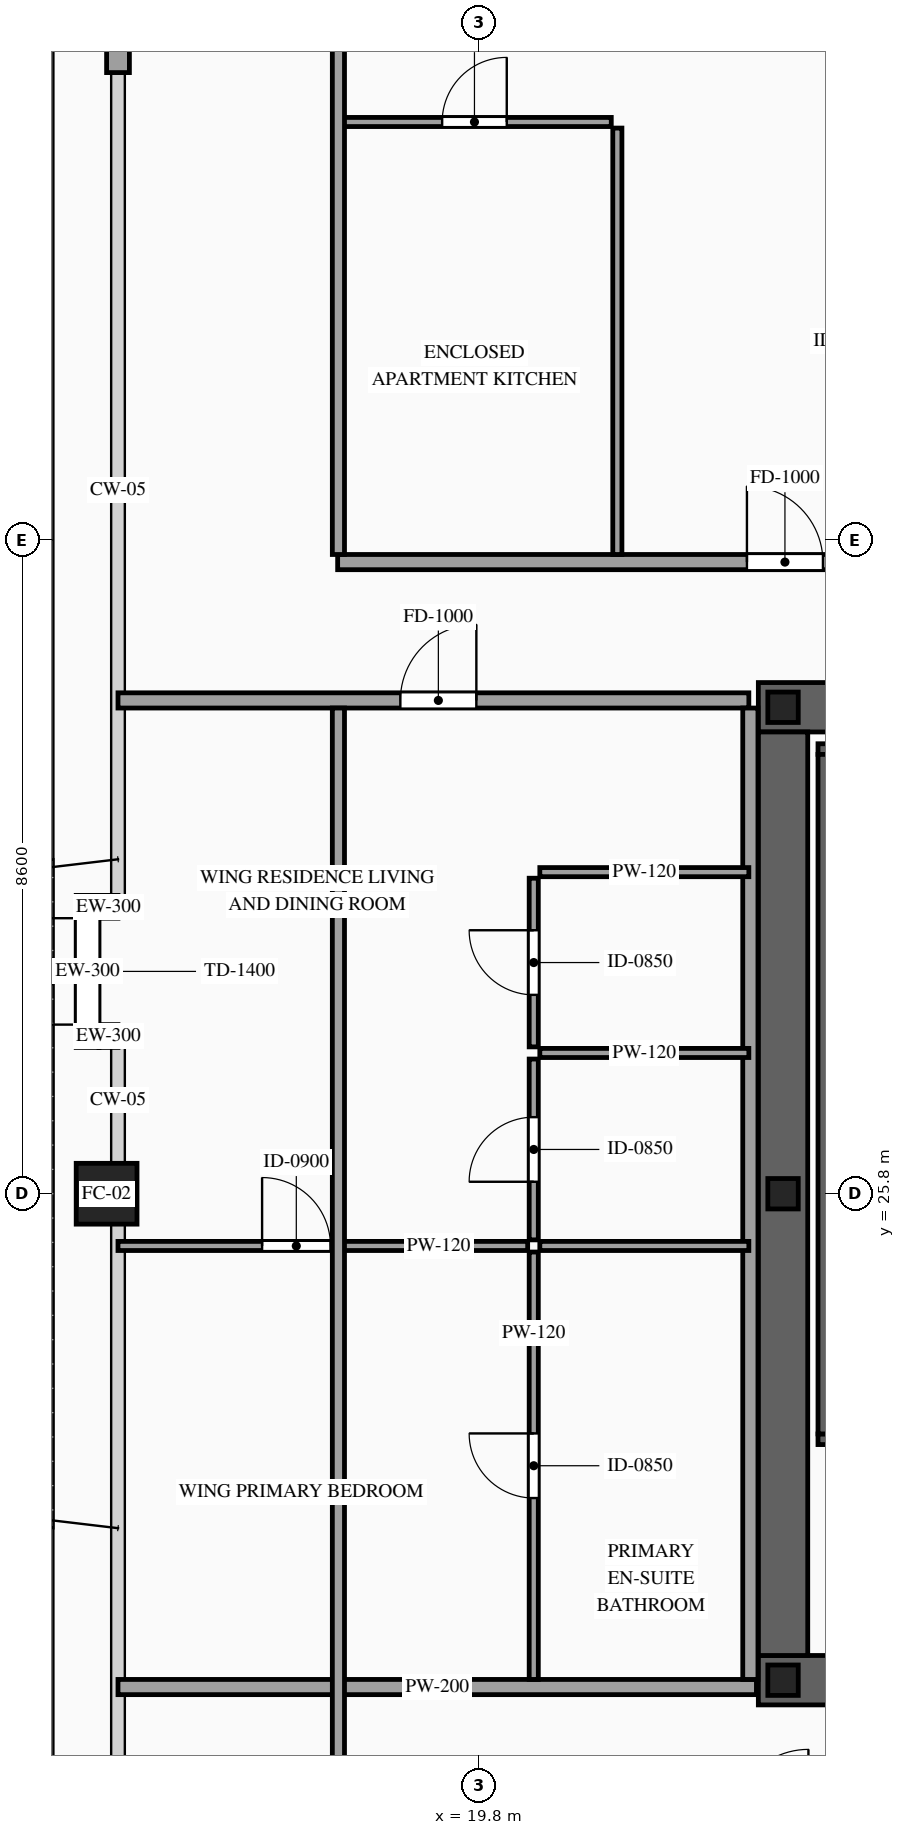
"""IFC4 building model, lengths in metres.
Left out: names, types, materials, properties, quantities, classifications, styles, units other than length and angle.
Written with IfcOpenShell. Run it as: python <this file> out.ifc"""

import sys

from ifc_helpers import new_model, si_unit, direction, frame, frame_2d, origin, origin_2d, place, context, subcontext, project, spatial, rectangle, hollow_rectangle, i_section, extrude, source, transform, mapped, element, fill, save


model = new_model("IFC4")
c1 = context("Model", 3, precision=1e-05, world=origin(), true_north=direction((0.0, 1.0)))
c2 = subcontext(c1, "Body", "Model", "MODEL_VIEW")
j1 = project(units=[si_unit("LENGTHUNIT", "METRE"), si_unit("PLANEANGLEUNIT", "RADIAN")], contexts=[c1])
p1 = place(None, origin())
s1 = spatial("IfcSite", under=j1, at=p1, CompositionType="ELEMENT")
p2 = place(p1, origin())
s2 = spatial("IfcBuilding", under=s1, at=p2, CompositionType="ELEMENT")
p3 = place(p2, frame((0.0, 0.0, 205.5)))
s3 = spatial("IfcBuildingStorey", under=s2, at=p3, CompositionType="ELEMENT", Elevation=205.5)
p4 = place(p3, frame((23.475, 19.4, 0.0), z_axis=(0.0, 0.0, 1.0), x_axis=(1.0, 0.0, 0.0)))
e1 = element("IfcWall", 1, at=p4, inside=s3, PredefinedType="SHEAR", context=c2, shape_type="SweptSolid", body=[
    extrude(rectangle(XDim=27.05, YDim=0.65, at=frame_2d((13.525, 0.0))), origin(), (0.0, 0.0, 1.0), 3.5),
])
p5 = place(p4, frame((1.975, 0.0, 0.0)))
e2 = element("IfcOpeningElement", 2, at=p5, cuts=e1, PredefinedType="OPENING", context=c2, shape_type="SweptSolid", body=[
    extrude(rectangle(XDim=1.1, YDim=2.2, at=frame_2d((0.55, 1.1))), frame((0.0, 0.34, 0.0), z_axis=(0.0, -1.0, 0.0), x_axis=(1.0, 0.0, 0.0)), (0.0, 0.0, 1.0), 0.68),
])
p6 = place(p4, frame((9.875, 0.0, 0.0)))
e3 = element("IfcOpeningElement", 3, at=p6, cuts=e1, PredefinedType="OPENING", context=c2, shape_type="SweptSolid", body=[
    extrude(rectangle(XDim=1.1, YDim=2.2, at=frame_2d((0.55, 1.1))), frame((0.0, 0.34, 0.0), z_axis=(0.0, -1.0, 0.0), x_axis=(1.0, 0.0, 0.0)), (0.0, 0.0, 1.0), 0.68),
])
p7 = place(p4, frame((23.075, 0.0, 0.0)))
e4 = element("IfcOpeningElement", 4, at=p7, cuts=e1, PredefinedType="OPENING", context=c2, shape_type="SweptSolid", body=[
    extrude(rectangle(XDim=1.1, YDim=2.2, at=frame_2d((0.55, 1.1))), frame((0.0, 0.34, 0.0), z_axis=(0.0, -1.0, 0.0), x_axis=(1.0, 0.0, 0.0)), (0.0, 0.0, 1.0), 0.68),
])
p8 = place(p4, frame((19.695, 0.0, 0.0)))
e5 = element("IfcOpeningElement", 5, at=p8, cuts=e1, PredefinedType="OPENING", context=c2, shape_type="SweptSolid", body=[
    extrude(rectangle(XDim=0.9, YDim=2.15, at=frame_2d((0.45, 1.075))), frame((0.0, 0.34, 0.0), z_axis=(0.0, -1.0, 0.0), x_axis=(1.0, 0.0, 0.0)), (0.0, 0.0, 1.0), 0.68),
])
p9 = place(p4, frame((18.255, 0.0, 0.0)))
e6 = element("IfcOpeningElement", 6, at=p9, cuts=e1, PredefinedType="OPENING", context=c2, shape_type="SweptSolid", body=[
    extrude(rectangle(XDim=0.9, YDim=2.15, at=frame_2d((0.45, 1.075))), frame((0.0, 0.34, 0.0), z_axis=(0.0, -1.0, 0.0), x_axis=(1.0, 0.0, 0.0)), (0.0, 0.0, 1.0), 0.68),
])
p10 = place(p3, frame((23.475, 32.2, 0.0), z_axis=(0.0, 0.0, 1.0), x_axis=(1.0, 0.0, 0.0)))
e7 = element("IfcWall", 7, at=p10, inside=s3, PredefinedType="SHEAR", context=c2, shape_type="SweptSolid", body=[
    extrude(rectangle(XDim=27.05, YDim=0.65, at=frame_2d((13.525, 0.0))), origin(), (0.0, 0.0, 1.0), 3.5),
])
p11 = place(p10, frame((4.595, 0.0, 0.0)))
e8 = element("IfcOpeningElement", 8, at=p11, cuts=e7, PredefinedType="OPENING", context=c2, shape_type="SweptSolid", body=[
    extrude(rectangle(XDim=0.9, YDim=2.15, at=frame_2d((0.45, 1.075))), frame((0.0, 0.34, 0.0), z_axis=(0.0, -1.0, 0.0), x_axis=(1.0, 0.0, 0.0)), (0.0, 0.0, 1.0), 0.68),
])
p12 = place(p10, frame((9.875, 0.0, 0.0)))
e9 = element("IfcOpeningElement", 9, at=p12, cuts=e7, PredefinedType="OPENING", context=c2, shape_type="SweptSolid", body=[
    extrude(rectangle(XDim=1.1, YDim=2.2, at=frame_2d((0.55, 1.1))), frame((0.0, 0.34, 0.0), z_axis=(0.0, -1.0, 0.0), x_axis=(1.0, 0.0, 0.0)), (0.0, 0.0, 1.0), 0.68),
])
p13 = place(p10, frame((15.725, 0.0, 0.0)))
e10 = element("IfcOpeningElement", 10, at=p13, cuts=e7, PredefinedType="OPENING", context=c2, shape_type="SweptSolid", body=[
    extrude(rectangle(XDim=1.1, YDim=2.2, at=frame_2d((0.55, 1.1))), frame((0.0, 0.34, 0.0), z_axis=(0.0, -1.0, 0.0), x_axis=(1.0, 0.0, 0.0)), (0.0, 0.0, 1.0), 0.68),
])
m1 = source(origin(), c2, "Body", "SweptSolid", [
    extrude(rectangle(XDim=12.15, YDim=0.65, at=frame_2d((6.075, 0.0))), origin(), (0.0, 0.0, 1.0), 3.5),
])
p14 = place(p3, frame((23.8, 19.725, 0.0), z_axis=(0.0, 0.0, 1.0), x_axis=(0.0, 1.0, 0.0)))
e11 = element("IfcWall", 11, at=p14, inside=s3, PredefinedType="SHEAR", context=c2, shape_type="MappedRepresentation", body=[
    mapped(m1, transform((0.0, 0.0, 0.0), scale=1.0)),
])
m2 = source(origin(), c2, "Body", "SweptSolid", [
    extrude(i_section(OverallWidth=0.4, OverallDepth=0.4, WebThickness=0.013, FlangeThickness=0.021, at=origin_2d()), origin(), (0.0, 0.0, 1.0), 3.5),
])
for number, where, z_axis, x_axis in (
    (12, (23.8, 19.4, 0.0), (0.0, 0.0, 1.0), (1.0, 0.0, 0.0)),
    (13, (23.8, 25.8, 0.0), (0.0, 0.0, 1.0), (1.0, 0.0, 0.0)),
    (14, (23.8, 32.2, 0.0), (0.0, 0.0, 1.0), (1.0, 0.0, 0.0)),
):
    element("IfcColumn", number, at=place(p3, frame(where, z_axis=z_axis, x_axis=x_axis)), inside=s3, PredefinedType="COLUMN", context=c2, shape_type="MappedRepresentation", body=[
        mapped(m2, transform((0.0, 0.0, 0.0), scale=1.0)),
    ])
m3 = source(origin(), c2, "Body", "SweptSolid", [
    extrude(hollow_rectangle(XDim=0.8, YDim=0.8, WallThickness=0.036, at=origin_2d()), origin(), (0.0, 0.0, 1.0), 3.5),
])
p15 = place(p3, frame((14.9, 25.8, 0.0), z_axis=(0.0, 0.0, 1.0), x_axis=(1.0, 0.0, 0.0)))
e15 = element("IfcColumn", 15, at=p15, inside=s3, PredefinedType="COLUMN", context=c2, shape_type="MappedRepresentation", body=[
    mapped(m3, transform((0.0, 0.0, 0.0), scale=1.0)),
])
m4 = source(origin(), c2, "Body", "SweptSolid", [
    extrude(rectangle(XDim=3.05, YDim=0.3, at=frame_2d((1.525, 0.0))), origin(), (0.0, 0.0, 1.0), 2.835),
])
p16 = place(p3, frame((15.05, 40.55, 0.0), z_axis=(0.0, 0.0, 1.0), x_axis=(0.0, 1.0, 0.0)))
e16 = element("IfcWall", 16, at=p16, inside=s3, PredefinedType="SOLIDWALL", context=c2, shape_type="MappedRepresentation", body=[
    mapped(m4, transform((0.0, 0.0, 0.0), scale=1.0)),
])
p17 = place(p3, frame((14.65, 27.725, 0.0), z_axis=(0.0, 0.0, 1.0), x_axis=(0.0, 1.0, 0.0)))
e17 = element("IfcWall", 17, at=p17, inside=s3, PredefinedType="SOLIDWALL", context=c2, shape_type="SweptSolid", body=[
    extrude(rectangle(XDim=2.0, YDim=0.3, at=frame_2d((1.0, 0.0))), origin(), (0.0, 0.0, 1.0), 2.835),
])
p18 = place(p17, frame((0.3, 0.0, 0.0)))
e18 = element("IfcOpeningElement", 18, at=p18, cuts=e17, PredefinedType="OPENING", context=c2, shape_type="SweptSolid", body=[
    extrude(rectangle(XDim=1.4, YDim=2.3, at=frame_2d((0.7, 1.15))), frame((0.0, 0.165, 0.0), z_axis=(0.0, -1.0, 0.0), x_axis=(1.0, 0.0, 0.0)), (0.0, 0.0, 1.0), 0.33),
])
m5 = source(origin(), c2, "Body", "SweptSolid", [
    extrude(rectangle(XDim=0.25, YDim=0.3, at=frame_2d((0.125, 0.0))), origin(), (0.0, 0.0, 1.0), 3.28),
])
for number, where, z_axis, x_axis in (
    (19, (15.05, 27.875, 0.0), (0.0, 0.0, 1.0), (-1.0, 0.0, 0.0)),
    (20, (14.8, 29.575, 0.0), (0.0, 0.0, 1.0), (1.0, 0.0, 0.0)),
):
    element("IfcWall", number, at=place(p3, frame(where, z_axis=z_axis, x_axis=x_axis)), inside=s3, PredefinedType="SOLIDWALL", context=c2, shape_type="MappedRepresentation", body=[
        mapped(m5, transform((0.0, 0.0, 0.0), scale=1.0)),
    ])
p19 = place(p3, frame((24.26, 22.57, 0.0), z_axis=(0.0, 0.0, 1.0), x_axis=(1.0, 0.0, 0.0)))
e21 = element("IfcWall", 21, at=p19, inside=s3, PredefinedType="SOLIDWALL", context=c2, shape_type="SweptSolid", body=[
    extrude(rectangle(XDim=3.28, YDim=0.14, at=frame_2d((1.64, 0.0))), origin(), (0.0, 0.0, 1.0), 3.28),
])
p20 = place(p19, frame((1.09, 0.0, 0.0)))
e22 = element("IfcOpeningElement", 22, at=p20, cuts=e21, PredefinedType="OPENING", context=c2, shape_type="SweptSolid", body=[
    extrude(rectangle(XDim=1.1, YDim=2.2, at=frame_2d((0.55, 1.1))), frame((0.0, 0.085, 0.0), z_axis=(0.0, -1.0, 0.0), x_axis=(1.0, 0.0, 0.0)), (0.0, 0.0, 1.0), 0.17),
])
m6 = source(origin(), c2, "Body", "SweptSolid", [
    extrude(rectangle(XDim=3.28, YDim=0.14, at=frame_2d((1.64, 0.0))), origin(), (0.0, 0.0, 1.0), 3.28),
])
p21 = place(p3, frame((24.26, 31.65, 0.0), z_axis=(0.0, 0.0, 1.0), x_axis=(1.0, 0.0, 0.0)))
e23 = element("IfcWall", 23, at=p21, inside=s3, PredefinedType="SOLIDWALL", context=c2, shape_type="MappedRepresentation", body=[
    mapped(m6, transform((0.0, 0.0, 0.0), scale=1.0)),
])
m7 = source(origin(), c2, "Body", "SweptSolid", [
    extrude(rectangle(XDim=8.94, YDim=0.14, at=frame_2d((4.47, 0.0))), origin(), (0.0, 0.0, 1.0), 3.28),
])
p22 = place(p3, frame((24.33, 22.64, 0.0), z_axis=(0.0, 0.0, 1.0), x_axis=(0.0, 1.0, 0.0)))
e24 = element("IfcWall", 24, at=p22, inside=s3, PredefinedType="SOLIDWALL", context=c2, shape_type="MappedRepresentation", body=[
    mapped(m7, transform((0.0, 0.0, 0.0), scale=1.0)),
])
p23 = place(p3, frame((17.94, 34.11, 0.0), z_axis=(0.0, 0.0, 1.0), x_axis=(1.0, 0.0, 0.0)))
e25 = element("IfcWall", 25, at=p23, inside=s3, PredefinedType="PARTITIONING", context=c2, shape_type="SweptSolid", body=[
    extrude(rectangle(XDim=12.881, YDim=0.2, at=frame_2d((6.44, 0.0))), origin(), (0.0, 0.0, 1.0), 3.28),
])
p24 = place(p23, frame((5.385, 0.0, 0.0)))
e26 = element("IfcOpeningElement", 26, at=p24, cuts=e25, PredefinedType="OPENING", context=c2, shape_type="SweptSolid", body=[
    extrude(rectangle(XDim=1.0, YDim=2.2, at=frame_2d((0.5, 1.1))), frame((0.0, 0.115, 0.0), z_axis=(0.0, -1.0, 0.0), x_axis=(1.0, 0.0, 0.0)), (0.0, 0.0, 1.0), 0.23),
])
p25 = place(p3, frame((17.94, 39.9, 0.0), z_axis=(0.0, 0.0, 1.0), x_axis=(1.0, 0.0, 0.0)))
e27 = element("IfcWall", 27, at=p25, inside=s3, PredefinedType="PARTITIONING", context=c2, shape_type="SweptSolid", body=[
    extrude(rectangle(XDim=3.6, YDim=0.12, at=frame_2d((1.8, 0.0))), origin(), (0.0, 0.0, 1.0), 3.28),
])
p26 = place(p25, frame((1.375, 0.0, 0.0)))
e28 = element("IfcOpeningElement", 28, at=p26, cuts=e27, PredefinedType="OPENING", context=c2, shape_type="SweptSolid", body=[
    extrude(rectangle(XDim=0.85, YDim=2.1, at=frame_2d((0.425, 1.05))), frame((0.0, 0.075, 0.0), z_axis=(0.0, -1.0, 0.0), x_axis=(1.0, 0.0, 0.0)), (0.0, 0.0, 1.0), 0.15),
])
m8 = source(origin(), c2, "Body", "SweptSolid", [
    extrude(rectangle(XDim=5.61, YDim=0.12, at=frame_2d((2.805, 0.0))), origin(), (0.0, 0.0, 1.0), 3.28),
])
p27 = place(p3, frame((21.62, 34.21, 0.0), z_axis=(0.0, 0.0, 1.0), x_axis=(0.0, 1.0, 0.0)))
e29 = element("IfcWall", 29, at=p27, inside=s3, PredefinedType="PARTITIONING", context=c2, shape_type="MappedRepresentation", body=[
    mapped(m8, transform((0.0, 0.0, 0.0), scale=1.0)),
])
m9 = source(origin(), c2, "Body", "SweptSolid", [
    extrude(rectangle(XDim=13.39, YDim=0.16, at=frame_2d((6.695, 0.0))), origin(), (0.0, 0.0, 1.0), 3.28),
])
p28 = place(p3, frame((17.95, 34.21, 0.0), z_axis=(0.0, 0.0, 1.0), x_axis=(0.0, 1.0, 0.0)))
e30 = element("IfcWall", 30, at=p28, inside=s3, PredefinedType="PARTITIONING", context=c2, shape_type="MappedRepresentation", body=[
    mapped(m9, transform((0.0, 0.0, 0.0), scale=1.0)),
])
p29 = place(p3, frame((15.05, 32.29, 0.0), z_axis=(0.0, 0.0, 1.0), x_axis=(1.0, 0.0, 0.0)))
e31 = element("IfcWall", 31, at=p29, inside=s3, PredefinedType="PARTITIONING", context=c2, shape_type="SweptSolid", body=[
    extrude(rectangle(XDim=8.3, YDim=0.2, at=frame_2d((4.15, 0.0))), origin(), (0.0, 0.0, 1.0), 2.775),
])
p30 = place(p29, frame((3.715, 0.0, 0.0)))
e32 = element("IfcOpeningElement", 32, at=p30, cuts=e31, PredefinedType="OPENING", context=c2, shape_type="SweptSolid", body=[
    extrude(rectangle(XDim=1.0, YDim=2.2, at=frame_2d((0.5, 1.1))), frame((0.0, 0.115, 0.0), z_axis=(0.0, -1.0, 0.0), x_axis=(1.0, 0.0, 0.0)), (0.0, 0.0, 1.0), 0.23),
])
m10 = source(origin(), c2, "Body", "SweptSolid", [
    extrude(rectangle(XDim=8.4, YDim=0.2, at=frame_2d((4.2, 0.0))), origin(), (0.0, 0.0, 1.0), 2.775),
])
p31 = place(p3, frame((15.05, 19.31, 0.0), z_axis=(0.0, 0.0, 1.0), x_axis=(1.0, 0.0, 0.0)))
e33 = element("IfcWall", 33, at=p31, inside=s3, PredefinedType="PARTITIONING", context=c2, shape_type="MappedRepresentation", body=[
    mapped(m10, transform((0.0, 0.0, 0.0), scale=1.0)),
])
m11 = source(origin(), c2, "Body", "SweptSolid", [
    extrude(rectangle(XDim=12.78, YDim=0.2, at=frame_2d((6.39, 0.0))), origin(), (0.0, 0.0, 1.0), 3.28),
])
p32 = place(p3, frame((23.37, 19.41, 0.0), z_axis=(0.0, 0.0, 1.0), x_axis=(0.0, 1.0, 0.0)))
e34 = element("IfcWall", 34, at=p32, inside=s3, PredefinedType="PARTITIONING", context=c2, shape_type="MappedRepresentation", body=[
    mapped(m11, transform((0.0, 0.0, 0.0), scale=1.0)),
])
m12 = source(origin(), c2, "Body", "SweptSolid", [
    extrude(rectangle(XDim=2.75, YDim=0.12, at=frame_2d((1.375, 0.0))), origin(), (0.0, 0.0, 1.0), 3.28),
])
for number, where, z_axis, x_axis in (
    (35, (20.6, 25.113, 0.0), (0.0, 0.0, 1.0), (1.0, 0.0, 0.0)),
    (36, (20.6, 27.652, 0.0), (0.0, 0.0, 1.0), (1.0, 0.0, 0.0)),
):
    element("IfcWall", number, at=place(p3, frame(where, z_axis=z_axis, x_axis=x_axis)), inside=s3, PredefinedType="PARTITIONING", context=c2, shape_type="MappedRepresentation", body=[
        mapped(m12, transform((0.0, 0.0, 0.0), scale=1.0)),
    ])
p33 = place(p3, frame((20.52, 25.193, 0.0), z_axis=(0.0, 0.0, 1.0), x_axis=(0.0, 1.0, 0.0)))
e37 = element("IfcWall", 37, at=p33, inside=s3, PredefinedType="PARTITIONING", context=c2, shape_type="SweptSolid", body=[
    extrude(rectangle(XDim=2.379, YDim=0.12, at=frame_2d((1.189, 0.0))), origin(), (0.0, 0.0, 1.0), 3.28),
])
p34 = place(p33, frame((0.764, 0.0, 0.0)))
e38 = element("IfcOpeningElement", 38, at=p34, cuts=e37, PredefinedType="OPENING", context=c2, shape_type="SweptSolid", body=[
    extrude(rectangle(XDim=0.85, YDim=2.1, at=frame_2d((0.425, 1.05))), frame((0.0, 0.075, 0.0), z_axis=(0.0, -1.0, 0.0), x_axis=(1.0, 0.0, 0.0)), (0.0, 0.0, 1.0), 0.15),
])
p35 = place(p3, frame((20.6, 30.031, 0.0), z_axis=(0.0, 0.0, 1.0), x_axis=(1.0, 0.0, 0.0)))
e39 = element("IfcWall", 39, at=p35, inside=s3, PredefinedType="PARTITIONING", context=c2, shape_type="MappedRepresentation", body=[
    mapped(m12, transform((0.0, 0.0, 0.0), scale=1.0)),
])
p36 = place(p3, frame((20.52, 27.732, 0.0), z_axis=(0.0, 0.0, 1.0), x_axis=(0.0, 1.0, 0.0)))
e40 = element("IfcWall", 40, at=p36, inside=s3, PredefinedType="PARTITIONING", context=c2, shape_type="SweptSolid", body=[
    extrude(rectangle(XDim=2.219, YDim=0.12, at=frame_2d((1.109, 0.0))), origin(), (0.0, 0.0, 1.0), 3.28),
])
p37 = place(p36, frame((0.685, 0.0, 0.0)))
e41 = element("IfcOpeningElement", 41, at=p37, cuts=e40, PredefinedType="OPENING", context=c2, shape_type="SweptSolid", body=[
    extrude(rectangle(XDim=0.85, YDim=2.1, at=frame_2d((0.425, 1.05))), frame((0.0, 0.075, 0.0), z_axis=(0.0, -1.0, 0.0), x_axis=(1.0, 0.0, 0.0)), (0.0, 0.0, 1.0), 0.15),
])
p38 = place(p3, frame((15.05, 25.113, 0.0), z_axis=(0.0, 0.0, 1.0), x_axis=(1.0, 0.0, 0.0)))
e42 = element("IfcWall", 42, at=p38, inside=s3, PredefinedType="PARTITIONING", context=c2, shape_type="SweptSolid", body=[
    extrude(rectangle(XDim=5.39, YDim=0.12, at=frame_2d((2.695, 0.0))), origin(), (0.0, 0.0, 1.0), 3.28),
])
p39 = place(p38, frame((1.896, 0.0, 0.0)))
e43 = element("IfcOpeningElement", 43, at=p39, cuts=e42, PredefinedType="OPENING", context=c2, shape_type="SweptSolid", body=[
    extrude(rectangle(XDim=0.9, YDim=2.15, at=frame_2d((0.45, 1.075))), frame((0.0, 0.075, 0.0), z_axis=(0.0, -1.0, 0.0), x_axis=(1.0, 0.0, 0.0)), (0.0, 0.0, 1.0), 0.15),
])
p40 = place(p3, frame((20.52, 19.41, 0.0), z_axis=(0.0, 0.0, 1.0), x_axis=(0.0, 1.0, 0.0)))
e44 = element("IfcWall", 44, at=p40, inside=s3, PredefinedType="PARTITIONING", context=c2, shape_type="SweptSolid", body=[
    extrude(rectangle(XDim=5.623, YDim=0.12, at=frame_2d((2.812, 0.0))), origin(), (0.0, 0.0, 1.0), 3.28),
])
p41 = place(p40, frame((2.386, 0.0, 0.0)))
e45 = element("IfcOpeningElement", 45, at=p41, cuts=e44, PredefinedType="OPENING", context=c2, shape_type="SweptSolid", body=[
    extrude(rectangle(XDim=0.85, YDim=2.1, at=frame_2d((0.425, 1.05))), frame((0.0, 0.075, 0.0), z_axis=(0.0, -1.0, 0.0), x_axis=(1.0, 0.0, 0.0)), (0.0, 0.0, 1.0), 0.15),
])
m13 = source(origin(), c2, "Body", "SweptSolid", [
    extrude(rectangle(XDim=28.19, YDim=0.16, at=frame_2d((14.095, 0.0))), origin(), (0.0, 0.0, 1.0), 3.28),
])
p42 = place(p3, frame((17.95, 4.0, 0.0), z_axis=(0.0, 0.0, 1.0), x_axis=(0.0, 1.0, 0.0)))
e46 = element("IfcWall", 46, at=p42, inside=s3, PredefinedType="PARTITIONING", context=c2, shape_type="MappedRepresentation", body=[
    mapped(m13, transform((0.0, 0.0, 0.0), scale=1.0)),
])
m14 = source(origin(), c2, "Body", "SweptSolid", [
    extrude(rectangle(XDim=1.4, YDim=2.3, at=frame_2d((0.7, 1.15))), frame((0.0, 0.025, 0.0), z_axis=(0.0, -1.0, 0.0), x_axis=(1.0, 0.0, 0.0)), (0.0, 0.0, 1.0), 0.05),
])
p43 = place(p18, origin())
e47 = element("IfcDoor", 47, at=p43, inside=s3, OperationType="DOUBLE_DOOR_SINGLE_SWING", PredefinedType="DOOR", context=c2, shape_type="MappedRepresentation", body=[
    mapped(m14, transform((0.0, 0.0, 0.0), scale=1.0)),
])
fill(e18, e47)
m15 = source(origin(), c2, "Body", "SweptSolid", [
    extrude(rectangle(XDim=1.0, YDim=2.2, at=frame_2d((0.5, 1.1))), frame((0.0, 0.025, 0.0), z_axis=(0.0, -1.0, 0.0), x_axis=(1.0, 0.0, 0.0)), (0.0, 0.0, 1.0), 0.05),
])
p44 = place(p24, origin())
e48 = element("IfcDoor", 48, at=p44, inside=s3, OperationType="SINGLE_SWING_LEFT", PredefinedType="DOOR", context=c2, shape_type="MappedRepresentation", body=[
    mapped(m15, transform((0.0, 0.0, 0.0), scale=1.0)),
])
fill(e26, e48)
m16 = source(origin(), c2, "Body", "SweptSolid", [
    extrude(rectangle(XDim=0.85, YDim=2.1, at=frame_2d((0.425, 1.05))), frame((0.0, 0.025, 0.0), z_axis=(0.0, -1.0, 0.0), x_axis=(1.0, 0.0, 0.0)), (0.0, 0.0, 1.0), 0.05),
])
p45 = place(p26, origin())
e49 = element("IfcDoor", 49, at=p45, inside=s3, OperationType="SINGLE_SWING_RIGHT", PredefinedType="DOOR", context=c2, shape_type="MappedRepresentation", body=[
    mapped(m16, transform((0.0, 0.0, 0.0), scale=1.0)),
])
fill(e28, e49)
p46 = place(p30, origin())
e50 = element("IfcDoor", 50, at=p46, inside=s3, OperationType="SINGLE_SWING_RIGHT", PredefinedType="DOOR", context=c2, shape_type="MappedRepresentation", body=[
    mapped(m15, transform((0.0, 0.0, 0.0), scale=1.0)),
])
fill(e32, e50)
p47 = place(p34, origin())
e51 = element("IfcDoor", 51, at=p47, inside=s3, OperationType="SINGLE_SWING_LEFT", PredefinedType="DOOR", context=c2, shape_type="MappedRepresentation", body=[
    mapped(m16, transform((0.0, 0.0, 0.0), scale=1.0)),
])
fill(e38, e51)
p48 = place(p37, origin())
e52 = element("IfcDoor", 52, at=p48, inside=s3, OperationType="SINGLE_SWING_RIGHT", PredefinedType="DOOR", context=c2, shape_type="MappedRepresentation", body=[
    mapped(m16, transform((0.0, 0.0, 0.0), scale=1.0)),
])
fill(e41, e52)
m17 = source(origin(), c2, "Body", "SweptSolid", [
    extrude(rectangle(XDim=0.9, YDim=2.15, at=frame_2d((0.45, 1.075))), frame((0.0, 0.025, 0.0), z_axis=(0.0, -1.0, 0.0), x_axis=(1.0, 0.0, 0.0)), (0.0, 0.0, 1.0), 0.05),
])
p49 = place(p39, origin())
e53 = element("IfcDoor", 53, at=p49, inside=s3, OperationType="SINGLE_SWING_LEFT", PredefinedType="DOOR", context=c2, shape_type="MappedRepresentation", body=[
    mapped(m17, transform((0.0, 0.0, 0.0), scale=1.0)),
])
fill(e43, e53)
p50 = place(p41, origin())
e54 = element("IfcDoor", 54, at=p50, inside=s3, OperationType="SINGLE_SWING_RIGHT", PredefinedType="DOOR", context=c2, shape_type="MappedRepresentation", body=[
    mapped(m16, transform((0.0, 0.0, 0.0), scale=1.0)),
])
fill(e45, e54)
save(model, sys.argv[1])
